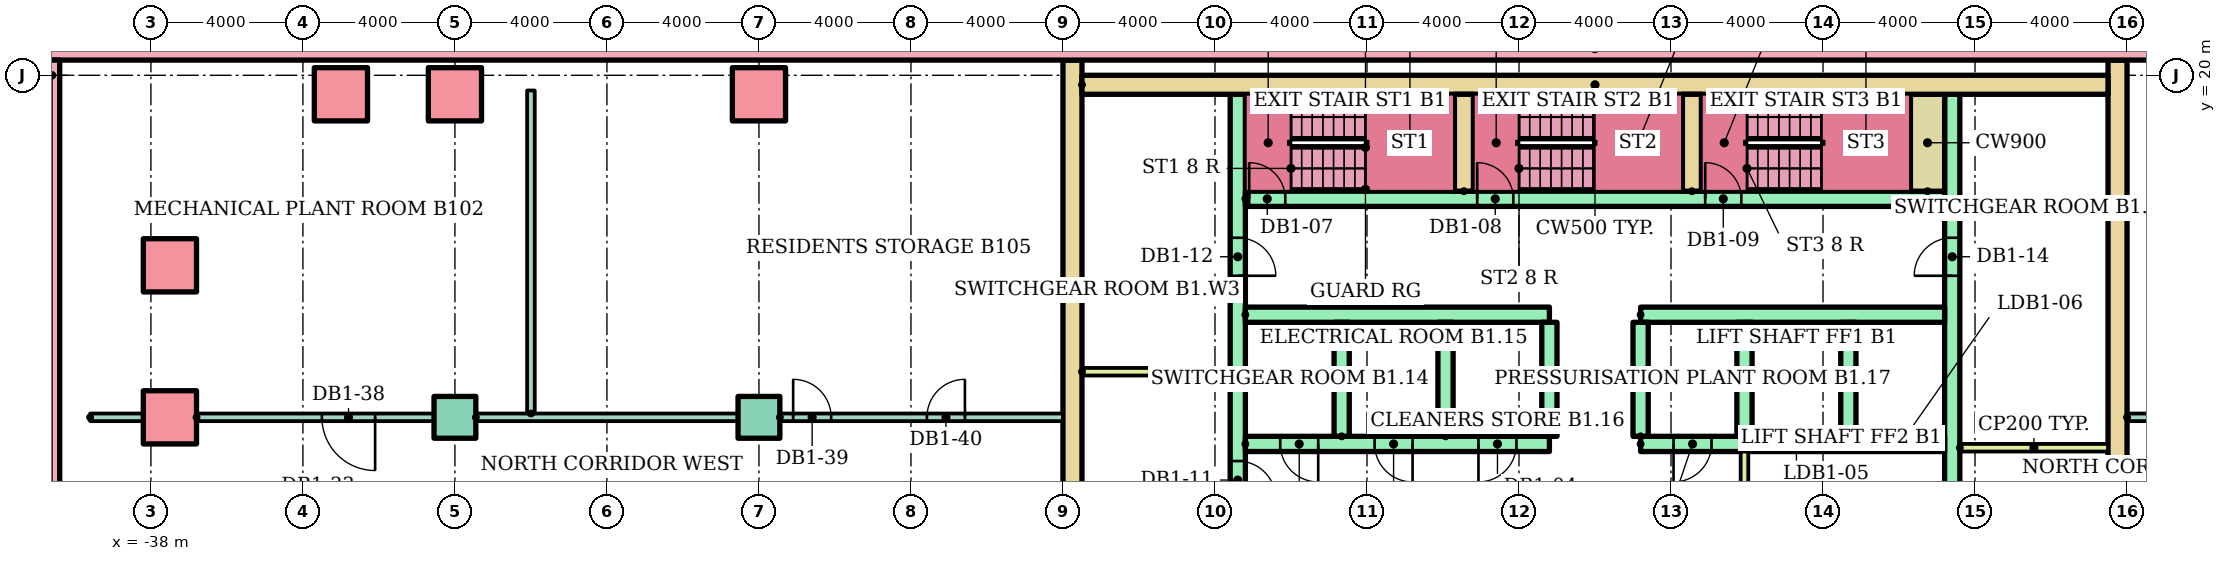
"""IFC4 building model, lengths in metres.
Left out: names, types, materials, properties, quantities, classifications, styles, units other than length and angle.
Written with IfcOpenShell. Run it as: python <this file> out.ifc"""

import sys

from ifc_helpers import new_model, si_unit, direction, frame, frame_2d, origin, origin_2d, place, context, subcontext, project, spatial, rectangle, hollow_rectangle, extrude, element, fill, save


model = new_model("IFC4")
c1 = context("Model", 3, precision=1e-05, world=origin(), true_north=direction((0.0, 1.0)))
c2 = subcontext(c1, "Body", "Model", "MODEL_VIEW")
j1 = project(units=[si_unit("LENGTHUNIT", "METRE"), si_unit("PLANEANGLEUNIT", "RADIAN")], contexts=[c1])
p1 = place(None, origin())
s1 = spatial("IfcSite", under=j1, at=p1, CompositionType="ELEMENT")
p2 = place(p1, origin())
s2 = spatial("IfcBuilding", under=s1, at=p2, CompositionType="ELEMENT")
p3 = place(p2, frame((0.0, 0.0, -5.0)))
s3 = spatial("IfcBuildingStorey", under=s2, at=p3, CompositionType="ELEMENT", Elevation=-5.0)
p4 = place(p3, frame((-41.0, 20.7, -0.35)))
e1 = element("IfcWall", 1, at=p4, inside=s3, PredefinedType="SOLIDWALL", context=c2, shape_type="SweptSolid", body=[
    extrude(rectangle(XDim=82.0, YDim=0.6, at=frame_2d((41.0, 0.0))), origin(), (0.0, 0.0, 1.0), 4.93),
])
p5 = place(p3, frame((-40.7, -50.4, -0.35), z_axis=(0.0, 0.0, 1.0), x_axis=(0.0, 1.0, 0.0)))
e2 = element("IfcWall", 2, at=p5, inside=s3, PredefinedType="SOLIDWALL", context=c2, shape_type="SweptSolid", body=[
    extrude(rectangle(XDim=70.8, YDim=0.6, at=frame_2d((35.4, 0.0))), origin(), (0.0, 0.0, 1.0), 4.93),
])
p6 = place(p3, frame((-37.5, 11.0, 0.0)))
e3 = element("IfcColumn", 3, at=p6, inside=s3, PredefinedType="COLUMN", context=c2, shape_type="SweptSolid", body=[
    extrude(hollow_rectangle(XDim=1.4, YDim=1.4, WallThickness=0.08, at=origin_2d()), origin(), (0.0, 0.0, 1.0), 5.0),
])
for number, where in (
    (4, (-30.0, 11.0, 0.0)),
    (5, (-22.0, 11.0, 0.0)),
):
    element("IfcColumn", number, at=place(p3, frame(where)), inside=s3, PredefinedType="COLUMN", context=c2, shape_type="SweptSolid", body=[
        extrude(rectangle(XDim=1.1, YDim=1.1, at=origin_2d()), origin(), (0.0, 0.0, 1.0), 5.0),
    ])
for number, where in (
    (6, (-37.5, 15.0, 0.0)),
    (7, (-33.0, 19.5, 0.0)),
    (8, (-30.0, 19.5, 0.0)),
    (9, (-22.0, 19.5, 0.0)),
):
    element("IfcColumn", number, at=place(p3, frame(where)), inside=s3, PredefinedType="COLUMN", context=c2, shape_type="SweptSolid", body=[
        extrude(hollow_rectangle(XDim=1.4, YDim=1.4, WallThickness=0.08, at=origin_2d()), origin(), (0.0, 0.0, 1.0), 5.0),
    ])
for number, where, z_axis, x_axis in (
    (10, (-13.75, 3.0, 0.0), (0.0, 0.0, 1.0), (0.0, 1.0, 0.0)),
    (11, (13.75, 3.0, 0.0), (0.0, 0.0, 1.0), (0.0, 1.0, 0.0)),
):
    element("IfcWall", number, at=place(p3, frame(where, z_axis=z_axis, x_axis=x_axis)), inside=s3, PredefinedType="SHEAR", context=c2, shape_type="SweptSolid", body=[
        extrude(rectangle(XDim=17.4, YDim=0.5, at=frame_2d((8.7, 0.0))), origin(), (0.0, 0.0, 1.0), 4.58),
    ])
p7 = place(p3, frame((-13.5, 19.75, 0.0)))
e12 = element("IfcWall", 12, at=p7, inside=s3, PredefinedType="SHEAR", context=c2, shape_type="SweptSolid", body=[
    extrude(rectangle(XDim=27.0, YDim=0.5, at=frame_2d((13.5, 0.0))), origin(), (0.0, 0.0, 1.0), 4.58),
])
p8 = place(p3, frame((-9.4, 6.8, 0.0), z_axis=(0.0, 0.0, 1.0), x_axis=(0.0, 1.0, 0.0)))
e13 = element("IfcWall", 13, at=p8, inside=s3, PredefinedType="SHEAR", context=c2, shape_type="SweptSolid", body=[
    extrude(rectangle(XDim=12.7, YDim=0.4, at=frame_2d((6.35, 0.0))), origin(), (0.0, 0.0, 1.0), 4.58),
])
p9 = place(p8, frame((0.3, 0.0, 0.0)))
e14 = element("IfcOpeningElement", 14, at=p9, cuts=e13, PredefinedType="OPENING", context=c2, shape_type="SweptSolid", body=[
    extrude(rectangle(XDim=1.0, YDim=2.1, at=frame_2d((0.5, 1.05))), frame((0.0, 0.21, 0.0), z_axis=(0.0, -1.0, 0.0), x_axis=(1.0, 0.0, 0.0)), (0.0, 0.0, 1.0), 0.42),
])
p10 = place(p8, frame((2.05, 0.0, 0.0)))
e15 = element("IfcOpeningElement", 15, at=p10, cuts=e13, PredefinedType="OPENING", context=c2, shape_type="SweptSolid", body=[
    extrude(rectangle(XDim=1.0, YDim=2.1, at=frame_2d((0.5, 1.05))), frame((0.0, 0.21, 0.0), z_axis=(0.0, -1.0, 0.0), x_axis=(1.0, 0.0, 0.0)), (0.0, 0.0, 1.0), 0.42),
])
p11 = place(p8, frame((7.925, 0.0, 0.0)))
e16 = element("IfcOpeningElement", 16, at=p11, cuts=e13, PredefinedType="OPENING", context=c2, shape_type="SweptSolid", body=[
    extrude(rectangle(XDim=1.0, YDim=2.1, at=frame_2d((0.5, 1.05))), frame((0.0, 0.21, 0.0), z_axis=(0.0, -1.0, 0.0), x_axis=(1.0, 0.0, 0.0)), (0.0, 0.0, 1.0), 0.42),
])
p12 = place(p3, frame((9.4, 6.8, 0.0), z_axis=(0.0, 0.0, 1.0), x_axis=(0.0, 1.0, 0.0)))
e17 = element("IfcWall", 17, at=p12, inside=s3, PredefinedType="SHEAR", context=c2, shape_type="SweptSolid", body=[
    extrude(rectangle(XDim=12.7, YDim=0.4, at=frame_2d((6.35, 0.0))), origin(), (0.0, 0.0, 1.0), 4.58),
])
p13 = place(p12, frame((1.15, 0.0, 0.0)))
e18 = element("IfcOpeningElement", 18, at=p13, cuts=e17, PredefinedType="OPENING", context=c2, shape_type="SweptSolid", body=[
    extrude(rectangle(XDim=1.0, YDim=2.1, at=frame_2d((0.5, 1.05))), frame((0.0, 0.21, 0.0), z_axis=(0.0, -1.0, 0.0), x_axis=(1.0, 0.0, 0.0)), (0.0, 0.0, 1.0), 0.42),
])
p14 = place(p12, frame((7.925, 0.0, 0.0)))
e19 = element("IfcOpeningElement", 19, at=p14, cuts=e17, PredefinedType="OPENING", context=c2, shape_type="SweptSolid", body=[
    extrude(rectangle(XDim=1.0, YDim=2.1, at=frame_2d((0.5, 1.05))), frame((0.0, 0.21, 0.0), z_axis=(0.0, -1.0, 0.0), x_axis=(1.0, 0.0, 0.0)), (0.0, 0.0, 1.0), 0.42),
])
p15 = place(p3, frame((-9.2, 10.3, 0.0)))
e20 = element("IfcWall", 20, at=p15, inside=s3, PredefinedType="SHEAR", context=c2, shape_type="SweptSolid", body=[
    extrude(rectangle(XDim=8.0, YDim=0.4, at=frame_2d((4.0, 0.0))), origin(), (0.0, 0.0, 1.0), 4.58),
])
p16 = place(p15, frame((0.917, 0.0, 0.0)))
e21 = element("IfcOpeningElement", 21, at=p16, cuts=e20, PredefinedType="OPENING", context=c2, shape_type="SweptSolid", body=[
    extrude(rectangle(XDim=1.0, YDim=2.1, at=frame_2d((0.5, 1.05))), frame((0.0, 0.21, 0.0), z_axis=(0.0, -1.0, 0.0), x_axis=(1.0, 0.0, 0.0)), (0.0, 0.0, 1.0), 0.42),
])
p17 = place(p15, frame((3.4, 0.0, 0.0)))
e22 = element("IfcOpeningElement", 22, at=p17, cuts=e20, PredefinedType="OPENING", context=c2, shape_type="SweptSolid", body=[
    extrude(rectangle(XDim=1.0, YDim=2.1, at=frame_2d((0.5, 1.05))), frame((0.0, 0.21, 0.0), z_axis=(0.0, -1.0, 0.0), x_axis=(1.0, 0.0, 0.0)), (0.0, 0.0, 1.0), 0.42),
])
p18 = place(p15, frame((6.133, 0.0, 0.0)))
e23 = element("IfcOpeningElement", 23, at=p18, cuts=e20, PredefinedType="OPENING", context=c2, shape_type="SweptSolid", body=[
    extrude(rectangle(XDim=1.0, YDim=2.1, at=frame_2d((0.5, 1.05))), frame((0.0, 0.21, 0.0), z_axis=(0.0, -1.0, 0.0), x_axis=(1.0, 0.0, 0.0)), (0.0, 0.0, 1.0), 0.42),
])
p19 = place(p3, frame((-9.2, 13.7, 0.0)))
e24 = element("IfcWall", 24, at=p19, inside=s3, PredefinedType="SHEAR", context=c2, shape_type="SweptSolid", body=[
    extrude(rectangle(XDim=8.0, YDim=0.4, at=frame_2d((4.0, 0.0))), origin(), (0.0, 0.0, 1.0), 4.58),
])
p20 = place(p3, frame((1.2, 10.3, 0.0)))
e25 = element("IfcWall", 25, at=p20, inside=s3, PredefinedType="SHEAR", context=c2, shape_type="SweptSolid", body=[
    extrude(rectangle(XDim=8.0, YDim=0.4, at=frame_2d((4.0, 0.0))), origin(), (0.0, 0.0, 1.0), 4.58),
])
p21 = place(p20, frame((3.55, 0.0, 0.0)))
e26 = element("IfcOpeningElement", 26, at=p21, cuts=e25, PredefinedType="OPENING", context=c2, shape_type="SweptSolid", body=[
    extrude(rectangle(XDim=1.1, YDim=2.1, at=frame_2d((0.55, 1.05))), frame((0.0, 0.21, 0.0), z_axis=(0.0, -1.0, 0.0), x_axis=(1.0, 0.0, 0.0)), (0.0, 0.0, 1.0), 0.42),
])
p22 = place(p20, frame((6.283, 0.0, 0.0)))
e27 = element("IfcOpeningElement", 27, at=p22, cuts=e25, PredefinedType="OPENING", context=c2, shape_type="SweptSolid", body=[
    extrude(rectangle(XDim=1.1, YDim=2.1, at=frame_2d((0.55, 1.05))), frame((0.0, 0.21, 0.0), z_axis=(0.0, -1.0, 0.0), x_axis=(1.0, 0.0, 0.0)), (0.0, 0.0, 1.0), 0.42),
])
p23 = place(p20, frame((0.867, 0.0, 0.0)))
e28 = element("IfcOpeningElement", 28, at=p23, cuts=e25, PredefinedType="OPENING", context=c2, shape_type="SweptSolid", body=[
    extrude(rectangle(XDim=1.0, YDim=2.1, at=frame_2d((0.5, 1.05))), frame((0.0, 0.21, 0.0), z_axis=(0.0, -1.0, 0.0), x_axis=(1.0, 0.0, 0.0)), (0.0, 0.0, 1.0), 0.42),
])
p24 = place(p3, frame((1.2, 13.7, 0.0)))
e29 = element("IfcWall", 29, at=p24, inside=s3, PredefinedType="SHEAR", context=c2, shape_type="SweptSolid", body=[
    extrude(rectangle(XDim=8.0, YDim=0.4, at=frame_2d((4.0, 0.0))), origin(), (0.0, 0.0, 1.0), 4.58),
])
for number, where, z_axis, x_axis in (
    (30, (-6.667, 10.5, 0.0), (0.0, 0.0, 1.0), (0.0, 1.0, 0.0)),
    (31, (-3.933, 10.5, 0.0), (0.0, 0.0, 1.0), (0.0, 1.0, 0.0)),
    (32, (-1.2, 10.5, 0.0), (0.0, 0.0, 1.0), (0.0, 1.0, 0.0)),
    (33, (1.2, 10.5, 0.0), (0.0, 0.0, 1.0), (0.0, 1.0, 0.0)),
    (34, (3.933, 10.5, 0.0), (0.0, 0.0, 1.0), (0.0, 1.0, 0.0)),
    (35, (6.667, 10.5, 0.0), (0.0, 0.0, 1.0), (0.0, 1.0, 0.0)),
):
    element("IfcWall", number, at=place(p3, frame(where, z_axis=z_axis, x_axis=x_axis)), inside=s3, PredefinedType="SHEAR", context=c2, shape_type="SweptSolid", body=[
        extrude(rectangle(XDim=3.0, YDim=0.4, at=frame_2d((1.5, 0.0))), origin(), (0.0, 0.0, 1.0), 4.58),
    ])
p25 = place(p3, frame((3.933, 6.8, 0.0), z_axis=(0.0, 0.0, 1.0), x_axis=(0.0, 1.0, 0.0)))
e36 = element("IfcWall", 36, at=p25, inside=s3, PredefinedType="PARTITIONING", context=c2, shape_type="SweptSolid", body=[
    extrude(rectangle(XDim=3.3, YDim=0.2, at=frame_2d((1.65, 0.0))), origin(), (0.0, 0.0, 1.0), 4.58),
])
p26 = place(p25, frame((1.1, 0.0, 0.0)))
e37 = element("IfcOpeningElement", 37, at=p26, cuts=e36, PredefinedType="OPENING", context=c2, shape_type="SweptSolid", body=[
    extrude(rectangle(XDim=1.1, YDim=2.1, at=frame_2d((0.55, 1.05))), frame((0.0, 0.11, 0.0), z_axis=(0.0, -1.0, 0.0), x_axis=(1.0, 0.0, 0.0)), (0.0, 0.0, 1.0), 0.22),
])
p27 = place(p3, frame((-9.2, 16.75, 0.0)))
e38 = element("IfcWall", 38, at=p27, inside=s3, PredefinedType="SHEAR", context=c2, shape_type="SweptSolid", body=[
    extrude(rectangle(XDim=18.4, YDim=0.4, at=frame_2d((9.2, 0.0))), origin(), (0.0, 0.0, 1.0), 4.58),
])
p28 = place(p27, frame((0.1, 0.0, 0.0)))
e39 = element("IfcOpeningElement", 39, at=p28, cuts=e38, PredefinedType="OPENING", context=c2, shape_type="SweptSolid", body=[
    extrude(rectangle(XDim=0.95, YDim=2.1, at=frame_2d((0.475, 1.05))), frame((0.0, 0.21, 0.0), z_axis=(0.0, -1.0, 0.0), x_axis=(1.0, 0.0, 0.0)), (0.0, 0.0, 1.0), 0.42),
])
p29 = place(p27, frame((6.1, 0.0, 0.0)))
e40 = element("IfcOpeningElement", 40, at=p29, cuts=e38, PredefinedType="OPENING", context=c2, shape_type="SweptSolid", body=[
    extrude(rectangle(XDim=0.95, YDim=2.1, at=frame_2d((0.475, 1.05))), frame((0.0, 0.21, 0.0), z_axis=(0.0, -1.0, 0.0), x_axis=(1.0, 0.0, 0.0)), (0.0, 0.0, 1.0), 0.42),
])
p30 = place(p27, frame((12.1, 0.0, 0.0)))
e41 = element("IfcOpeningElement", 41, at=p30, cuts=e38, PredefinedType="OPENING", context=c2, shape_type="SweptSolid", body=[
    extrude(rectangle(XDim=0.95, YDim=2.1, at=frame_2d((0.475, 1.05))), frame((0.0, 0.21, 0.0), z_axis=(0.0, -1.0, 0.0), x_axis=(1.0, 0.0, 0.0)), (0.0, 0.0, 1.0), 0.42),
])
for number, where, z_axis, x_axis in (
    (42, (-3.45, 16.95, 0.0), (0.0, 0.0, 1.0), (0.0, 1.0, 0.0)),
    (43, (2.55, 16.95, 0.0), (0.0, 0.0, 1.0), (0.0, 1.0, 0.0)),
):
    element("IfcWall", number, at=place(p3, frame(where, z_axis=z_axis, x_axis=x_axis)), inside=s3, PredefinedType="SHEAR", context=c2, shape_type="SweptSolid", body=[
        extrude(rectangle(XDim=2.55, YDim=0.5, at=frame_2d((1.275, 0.0))), origin(), (0.0, 0.0, 1.0), 4.58),
    ])
p31 = place(p3, frame((8.75, 16.95, 0.0), z_axis=(0.0, 0.0, 1.0), x_axis=(0.0, 1.0, 0.0)))
e44 = element("IfcWall", 44, at=p31, inside=s3, PredefinedType="SHEAR", context=c2, shape_type="SweptSolid", body=[
    extrude(rectangle(XDim=2.55, YDim=0.9, at=frame_2d((1.275, 0.0))), origin(), (0.0, 0.0, 1.0), 4.58),
])
for number, where in (
    (45, (-13.5, 12.2, 0.0)),
    (46, (9.6, 10.2, 0.0)),
):
    element("IfcWall", number, at=place(p3, frame(where)), inside=s3, PredefinedType="PARTITIONING", context=c2, shape_type="SweptSolid", body=[
        extrude(rectangle(XDim=3.9, YDim=0.2, at=frame_2d((1.95, 0.0))), origin(), (0.0, 0.0, 1.0), 4.58),
    ])
p32 = place(p3, frame((-39.6, 11.0, 0.0)))
e47 = element("IfcWall", 47, at=p32, inside=s3, PredefinedType="PARTITIONING", context=c2, shape_type="SweptSolid", body=[
    extrude(rectangle(XDim=1.4, YDim=0.2, at=frame_2d((0.7, 0.0))), origin(), (0.0, 0.0, 1.0), 4.58),
])
p33 = place(p3, frame((-36.8, 11.0, 0.0)))
e48 = element("IfcWall", 48, at=p33, inside=s3, PredefinedType="PARTITIONING", context=c2, shape_type="SweptSolid", body=[
    extrude(rectangle(XDim=6.25, YDim=0.2, at=frame_2d((3.125, 0.0))), origin(), (0.0, 0.0, 1.0), 4.58),
])
p34 = place(p33, frame((3.3, 0.0, 0.0)))
e49 = element("IfcOpeningElement", 49, at=p34, cuts=e48, PredefinedType="OPENING", context=c2, shape_type="SweptSolid", body=[
    extrude(rectangle(XDim=1.4, YDim=2.1, at=frame_2d((0.7, 1.05))), frame((0.0, 0.11, 0.0), z_axis=(0.0, -1.0, 0.0), x_axis=(1.0, 0.0, 0.0)), (0.0, 0.0, 1.0), 0.22),
])
p35 = place(p3, frame((-29.45, 11.0, 0.0)))
e50 = element("IfcWall", 50, at=p35, inside=s3, PredefinedType="PARTITIONING", context=c2, shape_type="SweptSolid", body=[
    extrude(rectangle(XDim=6.9, YDim=0.2, at=frame_2d((3.45, 0.0))), origin(), (0.0, 0.0, 1.0), 4.58),
])
p36 = place(p3, frame((-21.45, 11.0, 0.0)))
e51 = element("IfcWall", 51, at=p36, inside=s3, PredefinedType="PARTITIONING", context=c2, shape_type="SweptSolid", body=[
    extrude(rectangle(XDim=7.45, YDim=0.2, at=frame_2d((3.725, 0.0))), origin(), (0.0, 0.0, 1.0), 4.58),
])
p37 = place(p36, frame((0.35, 0.0, 0.0)))
e52 = element("IfcOpeningElement", 52, at=p37, cuts=e51, PredefinedType="OPENING", context=c2, shape_type="SweptSolid", body=[
    extrude(rectangle(XDim=1.0, YDim=2.1, at=frame_2d((0.5, 1.05))), frame((0.0, 0.11, 0.0), z_axis=(0.0, -1.0, 0.0), x_axis=(1.0, 0.0, 0.0)), (0.0, 0.0, 1.0), 0.22),
])
p38 = place(p36, frame((3.87, 0.0, 0.0)))
e53 = element("IfcOpeningElement", 53, at=p38, cuts=e51, PredefinedType="OPENING", context=c2, shape_type="SweptSolid", body=[
    extrude(rectangle(XDim=1.0, YDim=2.1, at=frame_2d((0.5, 1.05))), frame((0.0, 0.11, 0.0), z_axis=(0.0, -1.0, 0.0), x_axis=(1.0, 0.0, 0.0)), (0.0, 0.0, 1.0), 0.22),
])
p39 = place(p3, frame((14.0, 11.0, 0.0)))
e54 = element("IfcWall", 54, at=p39, inside=s3, PredefinedType="PARTITIONING", context=c2, shape_type="SweptSolid", body=[
    extrude(rectangle(XDim=3.45, YDim=0.2, at=frame_2d((1.725, 0.0))), origin(), (0.0, 0.0, 1.0), 4.58),
])
p40 = place(p3, frame((-28.0, 11.1, 0.0), z_axis=(0.0, 0.0, 1.0), x_axis=(0.0, 1.0, 0.0)))
e55 = element("IfcWall", 55, at=p40, inside=s3, PredefinedType="PARTITIONING", context=c2, shape_type="SweptSolid", body=[
    extrude(rectangle(XDim=8.5, YDim=0.2, at=frame_2d((4.25, 0.0))), origin(), (0.0, 0.0, 1.0), 4.58),
])
p41 = place(p21, origin())
e56 = element("IfcDoor", 56, at=p41, inside=s3, OperationType="SLIDING_TO_LEFT", PredefinedType="DOOR", context=c2, shape_type="SweptSolid", body=[
    extrude(rectangle(XDim=1.1, YDim=2.1, at=frame_2d((0.55, 1.05))), frame((0.0, 0.025, 0.0), z_axis=(0.0, -1.0, 0.0), x_axis=(1.0, 0.0, 0.0)), (0.0, 0.0, 1.0), 0.05),
])
fill(e26, e56)
p42 = place(p22, origin())
e57 = element("IfcDoor", 57, at=p42, inside=s3, OperationType="SLIDING_TO_LEFT", PredefinedType="DOOR", context=c2, shape_type="SweptSolid", body=[
    extrude(rectangle(XDim=1.1, YDim=2.1, at=frame_2d((0.55, 1.05))), frame((0.0, 0.025, 0.0), z_axis=(0.0, -1.0, 0.0), x_axis=(1.0, 0.0, 0.0)), (0.0, 0.0, 1.0), 0.05),
])
fill(e27, e57)
p43 = place(p16, frame((1.0, 0.0, 0.0), z_axis=(0.0, 0.0, 1.0), x_axis=(-1.0, 0.0, 0.0)))
e58 = element("IfcDoor", 58, at=p43, inside=s3, OperationType="SINGLE_SWING_RIGHT", PredefinedType="DOOR", context=c2, shape_type="SweptSolid", body=[
    extrude(rectangle(XDim=1.0, YDim=2.1, at=frame_2d((0.5, 1.05))), frame((0.0, 0.025, 0.0), z_axis=(0.0, -1.0, 0.0), x_axis=(1.0, 0.0, 0.0)), (0.0, 0.0, 1.0), 0.05),
])
fill(e21, e58)
p44 = place(p17, frame((1.0, 0.0, 0.0), z_axis=(0.0, 0.0, 1.0), x_axis=(-1.0, 0.0, 0.0)))
e59 = element("IfcDoor", 59, at=p44, inside=s3, OperationType="SINGLE_SWING_RIGHT", PredefinedType="DOOR", context=c2, shape_type="SweptSolid", body=[
    extrude(rectangle(XDim=1.0, YDim=2.1, at=frame_2d((0.5, 1.05))), frame((0.0, 0.025, 0.0), z_axis=(0.0, -1.0, 0.0), x_axis=(1.0, 0.0, 0.0)), (0.0, 0.0, 1.0), 0.05),
])
fill(e22, e59)
p45 = place(p18, frame((1.0, 0.0, 0.0), z_axis=(0.0, 0.0, 1.0), x_axis=(-1.0, 0.0, 0.0)))
e60 = element("IfcDoor", 60, at=p45, inside=s3, OperationType="SINGLE_SWING_LEFT", PredefinedType="DOOR", context=c2, shape_type="SweptSolid", body=[
    extrude(rectangle(XDim=1.0, YDim=2.1, at=frame_2d((0.5, 1.05))), frame((0.0, 0.025, 0.0), z_axis=(0.0, -1.0, 0.0), x_axis=(1.0, 0.0, 0.0)), (0.0, 0.0, 1.0), 0.05),
])
fill(e23, e60)
p46 = place(p23, frame((1.0, 0.0, 0.0), z_axis=(0.0, 0.0, 1.0), x_axis=(-1.0, 0.0, 0.0)))
e61 = element("IfcDoor", 61, at=p46, inside=s3, OperationType="SINGLE_SWING_LEFT", PredefinedType="DOOR", context=c2, shape_type="SweptSolid", body=[
    extrude(rectangle(XDim=1.0, YDim=2.1, at=frame_2d((0.5, 1.05))), frame((0.0, 0.025, 0.0), z_axis=(0.0, -1.0, 0.0), x_axis=(1.0, 0.0, 0.0)), (0.0, 0.0, 1.0), 0.05),
])
fill(e28, e61)
p47 = place(p28, origin())
e62 = element("IfcDoor", 62, at=p47, inside=s3, OperationType="SINGLE_SWING_LEFT", PredefinedType="DOOR", context=c2, shape_type="SweptSolid", body=[
    extrude(rectangle(XDim=0.95, YDim=2.1, at=frame_2d((0.475, 1.05))), frame((0.0, 0.025, 0.0), z_axis=(0.0, -1.0, 0.0), x_axis=(1.0, 0.0, 0.0)), (0.0, 0.0, 1.0), 0.05),
])
fill(e39, e62)
p48 = place(p29, origin())
e63 = element("IfcDoor", 63, at=p48, inside=s3, OperationType="SINGLE_SWING_LEFT", PredefinedType="DOOR", context=c2, shape_type="SweptSolid", body=[
    extrude(rectangle(XDim=0.95, YDim=2.1, at=frame_2d((0.475, 1.05))), frame((0.0, 0.025, 0.0), z_axis=(0.0, -1.0, 0.0), x_axis=(1.0, 0.0, 0.0)), (0.0, 0.0, 1.0), 0.05),
])
fill(e40, e63)
p49 = place(p30, origin())
e64 = element("IfcDoor", 64, at=p49, inside=s3, OperationType="SINGLE_SWING_LEFT", PredefinedType="DOOR", context=c2, shape_type="SweptSolid", body=[
    extrude(rectangle(XDim=0.95, YDim=2.1, at=frame_2d((0.475, 1.05))), frame((0.0, 0.025, 0.0), z_axis=(0.0, -1.0, 0.0), x_axis=(1.0, 0.0, 0.0)), (0.0, 0.0, 1.0), 0.05),
])
fill(e41, e64)
p50 = place(p10, frame((1.0, 0.0, 0.0), z_axis=(0.0, 0.0, 1.0), x_axis=(-1.0, 0.0, 0.0)))
e65 = element("IfcDoor", 65, at=p50, inside=s3, OperationType="SINGLE_SWING_LEFT", PredefinedType="DOOR", context=c2, shape_type="SweptSolid", body=[
    extrude(rectangle(XDim=1.0, YDim=2.1, at=frame_2d((0.5, 1.05))), frame((0.0, 0.025, 0.0), z_axis=(0.0, -1.0, 0.0), x_axis=(1.0, 0.0, 0.0)), (0.0, 0.0, 1.0), 0.05),
])
fill(e15, e65)
p51 = place(p11, frame((1.0, 0.0, 0.0), z_axis=(0.0, 0.0, 1.0), x_axis=(-1.0, 0.0, 0.0)))
e66 = element("IfcDoor", 66, at=p51, inside=s3, OperationType="SINGLE_SWING_LEFT", PredefinedType="DOOR", context=c2, shape_type="SweptSolid", body=[
    extrude(rectangle(XDim=1.0, YDim=2.1, at=frame_2d((0.5, 1.05))), frame((0.0, 0.025, 0.0), z_axis=(0.0, -1.0, 0.0), x_axis=(1.0, 0.0, 0.0)), (0.0, 0.0, 1.0), 0.05),
])
fill(e16, e66)
p52 = place(p14, origin())
e67 = element("IfcDoor", 67, at=p52, inside=s3, OperationType="SINGLE_SWING_LEFT", PredefinedType="DOOR", context=c2, shape_type="SweptSolid", body=[
    extrude(rectangle(XDim=1.0, YDim=2.1, at=frame_2d((0.5, 1.05))), frame((0.0, 0.025, 0.0), z_axis=(0.0, -1.0, 0.0), x_axis=(1.0, 0.0, 0.0)), (0.0, 0.0, 1.0), 0.05),
])
fill(e19, e67)
p53 = place(p34, frame((1.4, 0.0, 0.0), z_axis=(0.0, 0.0, 1.0), x_axis=(-1.0, 0.0, 0.0)))
e68 = element("IfcDoor", 68, at=p53, inside=s3, OperationType="DOUBLE_DOOR_SINGLE_SWING", PredefinedType="DOOR", context=c2, shape_type="SweptSolid", body=[
    extrude(rectangle(XDim=1.4, YDim=2.1, at=frame_2d((0.7, 1.05))), frame((0.0, 0.025, 0.0), z_axis=(0.0, -1.0, 0.0), x_axis=(1.0, 0.0, 0.0)), (0.0, 0.0, 1.0), 0.05),
])
fill(e49, e68)
p54 = place(p37, origin())
e69 = element("IfcDoor", 69, at=p54, inside=s3, OperationType="SINGLE_SWING_LEFT", PredefinedType="DOOR", context=c2, shape_type="SweptSolid", body=[
    extrude(rectangle(XDim=1.0, YDim=2.1, at=frame_2d((0.5, 1.05))), frame((0.0, 0.025, 0.0), z_axis=(0.0, -1.0, 0.0), x_axis=(1.0, 0.0, 0.0)), (0.0, 0.0, 1.0), 0.05),
])
fill(e52, e69)
p55 = place(p38, origin())
e70 = element("IfcDoor", 70, at=p55, inside=s3, OperationType="SINGLE_SWING_RIGHT", PredefinedType="DOOR", context=c2, shape_type="SweptSolid", body=[
    extrude(rectangle(XDim=1.0, YDim=2.1, at=frame_2d((0.5, 1.05))), frame((0.0, 0.025, 0.0), z_axis=(0.0, -1.0, 0.0), x_axis=(1.0, 0.0, 0.0)), (0.0, 0.0, 1.0), 0.05),
])
fill(e53, e70)
save(model, sys.argv[1])
